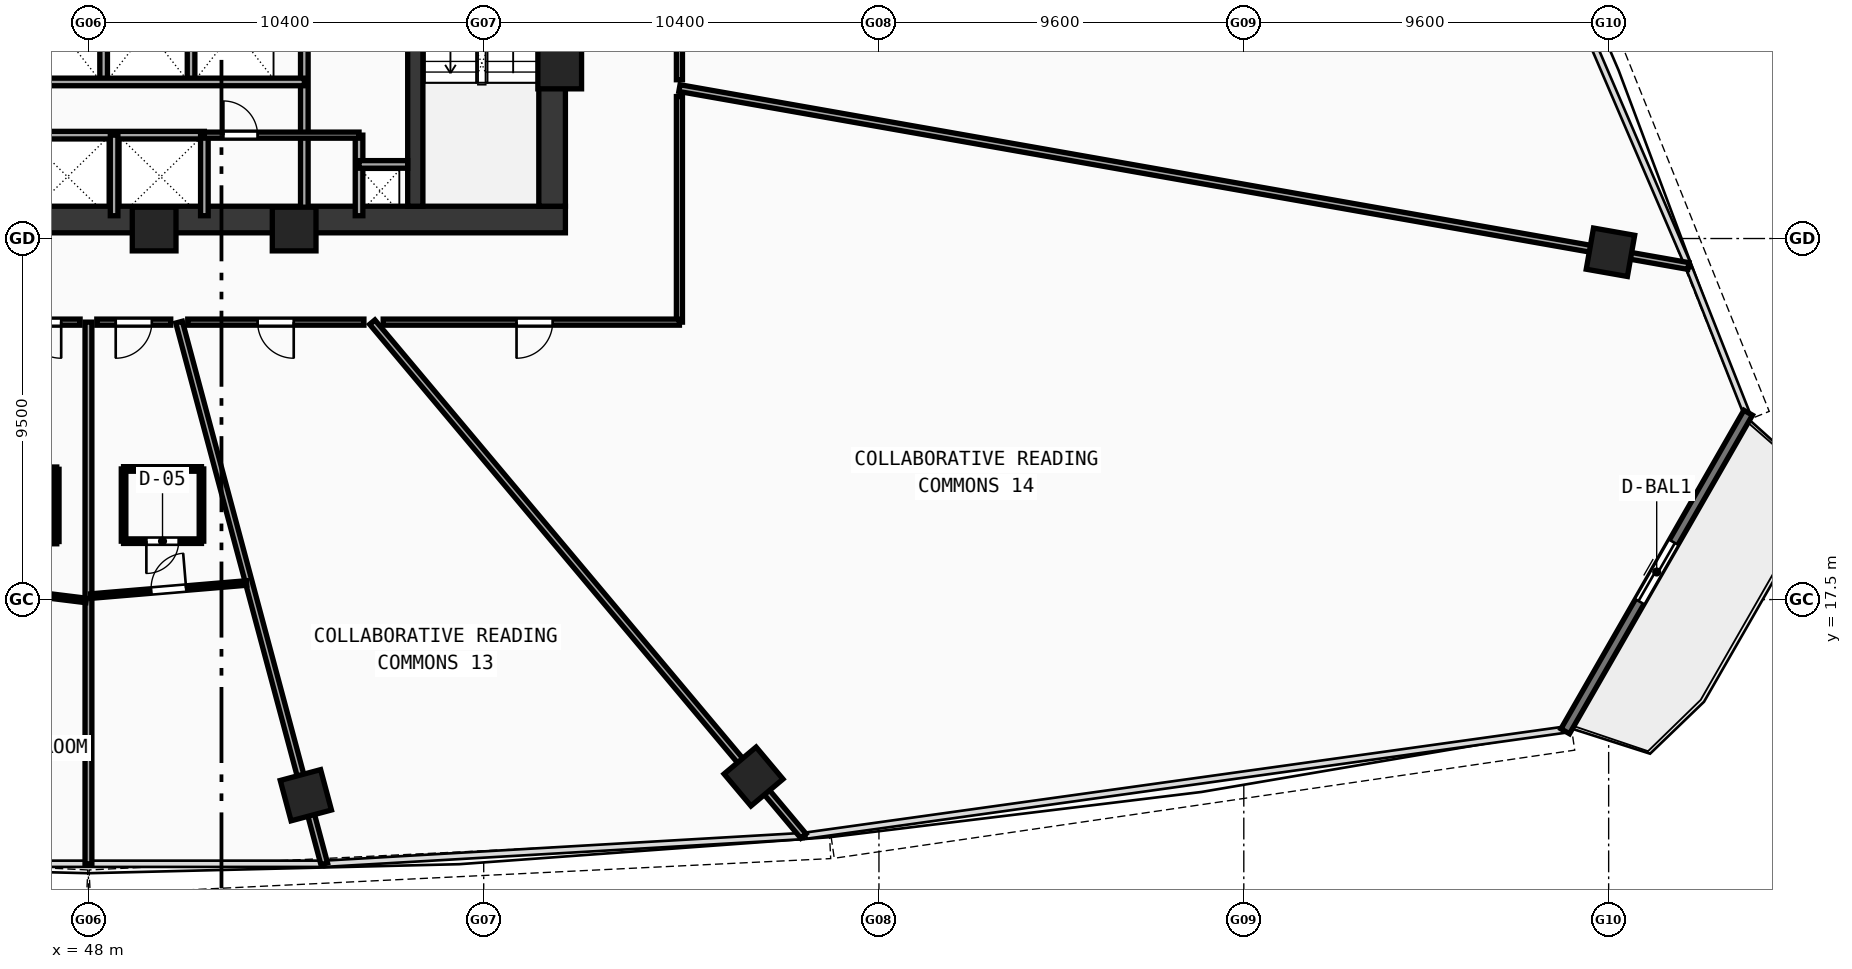
"""IFC4 building model, lengths in metres.
Left out: names, types, materials, properties, quantities, classifications, styles, units other than length and angle.
Written with IfcOpenShell. Run it as: python <this file> out.ifc"""

import sys

from ifc_helpers import new_model, si_unit, direction, frame, frame_2d, origin, origin_with_axes, origin_2d, place, context, subcontext, project, spatial, rectangle, hollow_rectangle, extrude, source, transform, mapped, element, fill, save


model = new_model("IFC4")
c1 = context("Model", 3, precision=1e-05, world=origin(), true_north=direction((0.0, 1.0)))
c2 = subcontext(c1, "Body", "Model", "MODEL_VIEW")
j1 = project(units=[si_unit("LENGTHUNIT", "METRE"), si_unit("PLANEANGLEUNIT", "RADIAN")], contexts=[c1])
p1 = place(None, origin())
s1 = spatial("IfcSite", under=j1, at=p1, CompositionType="ELEMENT")
p2 = place(p1, origin())
s2 = spatial("IfcBuilding", under=s1, at=p2, CompositionType="ELEMENT")
p3 = place(p2, frame((0.0, 0.0, 34.03)))
s3 = spatial("IfcBuildingStorey", under=s2, at=p3, CompositionType="ELEMENT", Elevation=34.03)
p4 = place(p3, frame((35.45, 27.5, 0.0), z_axis=(0.0, 0.0, 1.0), x_axis=(1.0, 0.0, 0.0)))
e1 = element("IfcWall", 1, at=p4, inside=s3, PredefinedType="SHEAR", context=c2, shape_type="SweptSolid", body=[
    extrude(rectangle(XDim=25.1, YDim=0.7, at=frame_2d((12.55, 0.0))), origin(), (0.0, 0.0, 1.0), 3.37),
])
p5 = place(p3, frame((60.2, 27.85, 0.0), z_axis=(0.0, 0.0, 1.0), x_axis=(0.0, 1.0, 0.0)))
e2 = element("IfcWall", 2, at=p5, inside=s3, PredefinedType="SHEAR", context=c2, shape_type="SweptSolid", body=[
    extrude(rectangle(XDim=12.0, YDim=0.7, at=frame_2d((6.0, 0.0))), origin(), (0.0, 0.0, 1.0), 3.37),
])
p6 = place(p3, frame((56.6, 27.85, 0.0), z_axis=(0.0, 0.0, 1.0), x_axis=(0.0, 1.0, 0.0)))
e3 = element("IfcWall", 3, at=p6, inside=s3, PredefinedType="SHEAR", context=c2, shape_type="SweptSolid", body=[
    extrude(rectangle(XDim=12.0, YDim=0.4, at=frame_2d((6.0, 0.0))), origin(), (0.0, 0.0, 1.0), 3.37),
])
p7 = place(p6, frame((9.9, 0.0, 0.0)))
e4 = element("IfcOpeningElement", 4, at=p7, cuts=e3, PredefinedType="OPENING", context=c2, shape_type="SweptSolid", body=[
    extrude(rectangle(XDim=1.1, YDim=2.1, at=frame_2d((0.55, 1.05))), frame((0.0, 0.21, 0.0), z_axis=(0.0, -1.0, 0.0), x_axis=(1.0, 0.0, 0.0)), (0.0, 0.0, 1.0), 0.42),
])
m1 = source(origin(), c2, "Body", "SweptSolid", [
    extrude(hollow_rectangle(XDim=1.15, YDim=1.15, WallThickness=0.048, at=origin_2d()), origin(), (0.0, 0.0, 1.0), 3.63),
])
for number, where, z_axis, x_axis in (
    (5, (49.729, 27.25, -0.26), (0.0, 0.0, 1.0), (1.0, 0.0, 0.0)),
    (6, (53.412, 27.25, -0.26), (0.0, 0.0, 1.0), (1.0, 0.0, 0.0)),
    (7, (60.4, 31.513, -0.26), (0.0, 0.0, 1.0), (1.0, 0.0, 0.0)),
):
    element("IfcColumn", number, at=place(p3, frame(where, z_axis=z_axis, x_axis=x_axis)), inside=s3, PredefinedType="COLUMN", context=c2, shape_type="MappedRepresentation", body=[
        mapped(m1, transform((0.0, 0.0, 0.0), scale=1.0)),
    ])
m2 = source(origin(), c2, "Body", "SweptSolid", [
    extrude(hollow_rectangle(XDim=1.1, YDim=1.1, WallThickness=0.045, at=origin_2d()), origin(), (0.0, 0.0, 1.0), 3.63),
])
for number, where, z_axis, x_axis in (
    (8, (53.72, 12.352, -0.26), (0.0, 0.0, 1.0), (0.966, 0.259, 0.0)),
    (9, (65.5, 12.844, -0.26), (0.0, 0.0, 1.0), (0.766, 0.643, 0.0)),
    (10, (88.048, 26.638, -0.26), (0.0, 0.0, 1.0), (0.174, 0.985, 0.0)),
):
    element("IfcColumn", number, at=place(p3, frame(where, z_axis=z_axis, x_axis=x_axis)), inside=s3, PredefinedType="COLUMN", context=c2, shape_type="MappedRepresentation", body=[
        mapped(m2, transform((0.0, 0.0, 0.0), scale=1.0)),
    ])
p8 = place(p3, frame((86.858, 14.035, 0.0), z_axis=(0.0, 0.0, 1.0), x_axis=(0.497938580997, 0.867212297857, 0.0)))
e11 = element("IfcWall", 11, at=p8, inside=s3, PredefinedType="STANDARD", context=c2, shape_type="SweptSolid", body=[
    extrude(rectangle(XDim=9.666, YDim=0.26, at=frame_2d((4.833, 0.0))), origin(), (0.0, 0.0, 1.0), 3.37),
])
p9 = place(p8, frame((3.933, 0.0, 0.0)))
e12 = element("IfcOpeningElement", 12, at=p9, cuts=e11, PredefinedType="OPENING", context=c2, shape_type="SweptSolid", body=[
    extrude(rectangle(XDim=1.8, YDim=2.15, at=frame_2d((0.9, 1.075))), frame((0.0, 0.14, 0.0), z_axis=(0.0, -1.0, 0.0), x_axis=(1.0, 0.0, 0.0)), (0.0, 0.0, 1.0), 0.28),
])
p10 = place(p3, frame((53.68, 27.6, 0.0), z_axis=(0.0, 0.0, 1.0), x_axis=(0.0, 1.0, 0.0)))
e13 = element("IfcWall", 13, at=p10, inside=s3, PredefinedType="SOLIDWALL", context=c2, shape_type="SweptSolid", body=[
    extrude(rectangle(XDim=9.05, YDim=0.2, at=frame_2d((4.525, 0.0))), origin(), (0.0, 0.0, 1.0), 3.37),
])
p11 = place(p10, frame((6.9, 0.0, 0.0)))
e14 = element("IfcOpeningElement", 14, at=p11, cuts=e13, PredefinedType="OPENING", context=c2, shape_type="SweptSolid", body=[
    extrude(rectangle(XDim=1.05, YDim=2.1, at=frame_2d((0.525, 1.05))), frame((0.0, 0.11, 0.0), z_axis=(0.0, -1.0, 0.0), x_axis=(1.0, 0.0, 0.0)), (0.0, 0.0, 1.0), 0.22),
])
for number, where, z_axis, x_axis in (
    (15, (48.4, 31.12, 0.0), (0.0, 0.0, 1.0), (0.0, 1.0, 0.0)),
    (16, (50.7, 31.12, 0.0), (0.0, 0.0, 1.0), (0.0, 1.0, 0.0)),
):
    element("IfcWall", number, at=place(p3, frame(where, z_axis=z_axis, x_axis=x_axis)), inside=s3, PredefinedType="SOLIDWALL", context=c2, shape_type="SweptSolid", body=[
        extrude(rectangle(XDim=2.7, YDim=0.2, at=frame_2d((1.35, 0.0))), origin(), (0.0, 0.0, 1.0), 3.37),
    ])
p12 = place(p3, frame((43.85, 29.72, 0.0), z_axis=(0.0, 0.0, 1.0), x_axis=(1.0, 0.0, 0.0)))
e17 = element("IfcWall", 17, at=p12, inside=s3, PredefinedType="SOLIDWALL", context=c2, shape_type="SweptSolid", body=[
    extrude(rectangle(XDim=7.2, YDim=0.2, at=frame_2d((3.6, 0.0))), origin(), (0.0, 0.0, 1.0), 3.37),
])
p13 = place(p3, frame((51.05, 27.6, 0.0), z_axis=(0.0, 0.0, 1.0), x_axis=(0.0, 1.0, 0.0)))
e18 = element("IfcWall", 18, at=p13, inside=s3, PredefinedType="SOLIDWALL", context=c2, shape_type="SweptSolid", body=[
    extrude(rectangle(XDim=2.12, YDim=0.2, at=frame_2d((1.06, 0.0))), origin(), (0.0, 0.0, 1.0), 3.37),
])
p14 = place(p3, frame((43.85, 31.12, 0.0), z_axis=(0.0, 0.0, 1.0), x_axis=(1.0, 0.0, 0.0)))
e19 = element("IfcWall", 19, at=p14, inside=s3, PredefinedType="SOLIDWALL", context=c2, shape_type="SweptSolid", body=[
    extrude(rectangle(XDim=9.83, YDim=0.2, at=frame_2d((4.915, 0.0))), origin(), (0.0, 0.0, 1.0), 3.37),
])
for number, where, z_axis, x_axis in (
    (20, (48.675, 27.6, 0.0), (0.0, 0.0, 1.0), (0.0, 1.0, 0.0)),
    (21, (55.12, 27.6, 0.0), (0.0, 0.0, 1.0), (0.0, 1.0, 0.0)),
):
    element("IfcWall", number, at=place(p3, frame(where, z_axis=z_axis, x_axis=x_axis)), inside=s3, PredefinedType="SOLIDWALL", context=c2, shape_type="SweptSolid", body=[
        extrude(rectangle(XDim=2.12, YDim=0.2, at=frame_2d((1.06, 0.0))), origin(), (0.0, 0.0, 1.0), 3.37),
    ])
p15 = place(p3, frame((55.12, 28.95, 0.0), z_axis=(0.0, 0.0, 1.0), x_axis=(1.0, 0.0, 0.0)))
e22 = element("IfcWall", 22, at=p15, inside=s3, PredefinedType="SOLIDWALL", context=c2, shape_type="SweptSolid", body=[
    extrude(rectangle(XDim=1.28, YDim=0.2, at=frame_2d((0.64, 0.0))), origin(), (0.0, 0.0, 1.0), 3.37),
])
p16 = place(p3, frame((51.05, 29.72, 0.0), z_axis=(0.0, 0.0, 1.0), x_axis=(1.0, 0.0, 0.0)))
e23 = element("IfcWall", 23, at=p16, inside=s3, PredefinedType="PARTITIONING", context=c2, shape_type="SweptSolid", body=[
    extrude(rectangle(XDim=4.07, YDim=0.16, at=frame_2d((2.035, 0.0))), origin(), (0.0, 0.0, 1.0), 3.37),
])
p17 = place(p16, frame((0.5, 0.0, 0.0)))
e24 = element("IfcOpeningElement", 24, at=p17, cuts=e23, PredefinedType="OPENING", context=c2, shape_type="SweptSolid", body=[
    extrude(rectangle(XDim=0.9, YDim=2.1, at=frame_2d((0.45, 1.05))), frame((0.0, 0.09, 0.0), z_axis=(0.0, -1.0, 0.0), x_axis=(1.0, 0.0, 0.0)), (0.0, 0.0, 1.0), 0.18),
])
p18 = place(p3, frame((48.0, 24.8, 0.0), z_axis=(0.0, 0.0, 1.0), x_axis=(0.0, -1.0, 0.0)))
e25 = element("IfcWall", 25, at=p18, inside=s3, PredefinedType="PARTITIONING", context=c2, shape_type="SweptSolid", body=[
    extrude(rectangle(XDim=14.252, YDim=0.18, at=frame_2d((7.126, 0.0))), origin(), (0.0, 0.0, 1.0), 2.67),
])
p19 = place(p3, frame((50.385, 24.8, 0.0), z_axis=(0.0, 0.0, 1.0), x_axis=(0.258822100979, -0.965925007464, 0.0)))
e26 = element("IfcWall", 26, at=p19, inside=s3, PredefinedType="PARTITIONING", context=c2, shape_type="SweptSolid", body=[
    extrude(rectangle(XDim=14.755, YDim=0.18, at=frame_2d((7.377, 0.0))), origin(), (0.0, 0.0, 1.0), 2.67),
])
p20 = place(p3, frame((55.468, 24.8, 0.0), z_axis=(0.0, 0.0, 1.0), x_axis=(0.642784869497, -0.766046742403, 0.0)))
e27 = element("IfcWall", 27, at=p20, inside=s3, PredefinedType="PARTITIONING", context=c2, shape_type="SweptSolid", body=[
    extrude(rectangle(XDim=17.65, YDim=0.18, at=frame_2d((8.825, 0.0))), origin(), (0.0, 0.0, 1.0), 2.67),
])
p21 = place(p3, frame((63.55, 30.958, 0.0), z_axis=(0.0, 0.0, 1.0), x_axis=(0.984807983054, -0.17364687303, 0.0)))
e28 = element("IfcWall", 28, at=p21, inside=s3, PredefinedType="PARTITIONING", context=c2, shape_type="SweptSolid", body=[
    extrude(rectangle(XDim=26.958, YDim=0.18, at=frame_2d((13.479, 0.0))), origin(), (0.0, 0.0, 1.0), 2.67),
])
p22 = place(p3, frame((63.55, 41.064, 0.0), z_axis=(0.0, 0.0, 1.0), x_axis=(0.0, -1.0, 0.0)))
e29 = element("IfcWall", 29, at=p22, inside=s3, PredefinedType="PARTITIONING", context=c2, shape_type="SweptSolid", body=[
    extrude(rectangle(XDim=9.886, YDim=0.16, at=frame_2d((4.943, 0.0))), origin(), (0.0, 0.0, 1.0), 2.67),
])
p23 = place(p22, frame((4.468, 0.0, 0.0)))
e30 = element("IfcOpeningElement", 30, at=p23, cuts=e29, PredefinedType="OPENING", context=c2, shape_type="SweptSolid", body=[
    extrude(rectangle(XDim=0.95, YDim=2.1, at=frame_2d((0.475, 1.05))), frame((0.0, 0.09, 0.0), z_axis=(0.0, -1.0, 0.0), x_axis=(1.0, 0.0, 0.0)), (0.0, 0.0, 1.0), 0.18),
])
p24 = place(p3, frame((63.55, 30.735, 0.0), z_axis=(0.0, 0.0, 1.0), x_axis=(0.0, -1.0, 0.0)))
e31 = element("IfcWall", 31, at=p24, inside=s3, PredefinedType="PARTITIONING", context=c2, shape_type="SweptSolid", body=[
    extrude(rectangle(XDim=5.935, YDim=0.16, at=frame_2d((2.967, 0.0))), origin(), (0.0, 0.0, 1.0), 2.97),
])
p25 = place(p3, frame((63.55, 24.8, 0.0), z_axis=(0.0, 0.0, 1.0), x_axis=(-1.0, 0.0, 0.0)))
e32 = element("IfcWall", 32, at=p25, inside=s3, PredefinedType="PARTITIONING", context=c2, shape_type="SweptSolid", body=[
    extrude(rectangle(XDim=7.795, YDim=0.16, at=frame_2d((3.897, 0.0))), origin(), (0.0, 0.0, 1.0), 2.97),
])
p26 = place(p25, frame((3.336, 0.0, 0.0)))
e33 = element("IfcOpeningElement", 33, at=p26, cuts=e32, PredefinedType="OPENING", context=c2, shape_type="SweptSolid", body=[
    extrude(rectangle(XDim=0.95, YDim=2.1, at=frame_2d((0.475, 1.05))), frame((0.0, 0.09, 0.0), z_axis=(0.0, -1.0, 0.0), x_axis=(1.0, 0.0, 0.0)), (0.0, 0.0, 1.0), 0.18),
])
p27 = place(p3, frame((55.248, 24.8, 0.0), z_axis=(0.0, 0.0, 1.0), x_axis=(-1.0, 0.0, 0.0)))
e34 = element("IfcWall", 34, at=p27, inside=s3, PredefinedType="PARTITIONING", context=c2, shape_type="SweptSolid", body=[
    extrude(rectangle(XDim=4.635, YDim=0.16, at=frame_2d((2.318, 0.0))), origin(), (0.0, 0.0, 1.0), 2.67),
])
p28 = place(p27, frame((1.847, 0.0, 0.0)))
e35 = element("IfcOpeningElement", 35, at=p28, cuts=e34, PredefinedType="OPENING", context=c2, shape_type="SweptSolid", body=[
    extrude(rectangle(XDim=0.95, YDim=2.1, at=frame_2d((0.475, 1.05))), frame((0.0, 0.09, 0.0), z_axis=(0.0, -1.0, 0.0), x_axis=(1.0, 0.0, 0.0)), (0.0, 0.0, 1.0), 0.18),
])
p29 = place(p3, frame((50.165, 24.8, 0.0), z_axis=(0.0, 0.0, 1.0), x_axis=(-1.0, 0.0, 0.0)))
e36 = element("IfcWall", 36, at=p29, inside=s3, PredefinedType="PARTITIONING", context=c2, shape_type="SweptSolid", body=[
    extrude(rectangle(XDim=1.945, YDim=0.16, at=frame_2d((0.972, 0.0))), origin(), (0.0, 0.0, 1.0), 3.37),
])
p30 = place(p29, frame((0.498, 0.0, 0.0)))
e37 = element("IfcOpeningElement", 37, at=p30, cuts=e36, PredefinedType="OPENING", context=c2, shape_type="SweptSolid", body=[
    extrude(rectangle(XDim=0.95, YDim=2.1, at=frame_2d((0.475, 1.05))), frame((0.0, 0.09, 0.0), z_axis=(0.0, -1.0, 0.0), x_axis=(1.0, 0.0, 0.0)), (0.0, 0.0, 1.0), 0.18),
])
p31 = place(p3, frame((47.78, 24.8, 0.0), z_axis=(0.0, 0.0, 1.0), x_axis=(-1.0, 0.0, 0.0)))
e38 = element("IfcWall", 38, at=p31, inside=s3, PredefinedType="PARTITIONING", context=c2, shape_type="SweptSolid", body=[
    extrude(rectangle(XDim=1.945, YDim=0.16, at=frame_2d((0.972, 0.0))), origin(), (0.0, 0.0, 1.0), 3.37),
])
p32 = place(p31, frame((0.497, 0.0, 0.0)))
e39 = element("IfcOpeningElement", 39, at=p32, cuts=e38, PredefinedType="OPENING", context=c2, shape_type="SweptSolid", body=[
    extrude(rectangle(XDim=0.95, YDim=2.1, at=frame_2d((0.475, 1.05))), frame((0.0, 0.09, 0.0), z_axis=(0.0, -1.0, 0.0), x_axis=(1.0, 0.0, 0.0)), (0.0, 0.0, 1.0), 0.18),
])
p33 = place(p3, frame((45.116, 19.028, 0.0), z_axis=(0.0, 0.0, 1.0), x_axis=(1.0, 0.0, 0.0)))
e40 = element("IfcWall", 40, at=p33, inside=s3, PredefinedType="PARTITIONING", context=c2, shape_type="SweptSolid", body=[
    extrude(rectangle(XDim=2.05, YDim=0.12, at=frame_2d((1.025, 0.0))), origin(), (0.0, 0.0, 1.0), 3.37),
])
p34 = place(p33, frame((0.6, 0.0, 0.0)))
e41 = element("IfcOpeningElement", 41, at=p34, cuts=e40, PredefinedType="OPENING", context=c2, shape_type="SweptSolid", body=[
    extrude(rectangle(XDim=0.85, YDim=2.1, at=frame_2d((0.425, 1.05))), frame((0.0, 0.07, 0.0), z_axis=(0.0, -1.0, 0.0), x_axis=(1.0, 0.0, 0.0)), (0.0, 0.0, 1.0), 0.14),
])
p35 = place(p3, frame((47.166, 19.028, 0.0), z_axis=(0.0, 0.0, 1.0), x_axis=(0.0, 1.0, 0.0)))
e42 = element("IfcWall", 42, at=p35, inside=s3, PredefinedType="PARTITIONING", context=c2, shape_type="SweptSolid", body=[
    extrude(rectangle(XDim=1.9, YDim=0.12, at=frame_2d((0.95, 0.0))), origin(), (0.0, 0.0, 1.0), 3.37),
])
p36 = place(p3, frame((47.166, 20.928, 0.0), z_axis=(0.0, 0.0, 1.0), x_axis=(-1.0, 0.0, 0.0)))
e43 = element("IfcWall", 43, at=p36, inside=s3, PredefinedType="PARTITIONING", context=c2, shape_type="SweptSolid", body=[
    extrude(rectangle(XDim=2.05, YDim=0.12, at=frame_2d((1.025, 0.0))), origin(), (0.0, 0.0, 1.0), 3.37),
])
p37 = place(p3, frame((43.85, 17.981, 0.0), z_axis=(0.0, 0.0, 1.0), x_axis=(0.992487897066, -0.122342855029, 0.0)))
e44 = element("IfcWall", 44, at=p37, inside=s3, PredefinedType="PARTITIONING", context=c2, shape_type="SweptSolid", body=[
    extrude(rectangle(XDim=4.121, YDim=0.12, at=frame_2d((2.061, 0.0))), origin(), (0.0, 0.0, 1.0), 2.67),
])
p38 = place(p37, frame((1.6, 0.0, 0.0)))
e45 = element("IfcOpeningElement", 45, at=p38, cuts=e44, PredefinedType="OPENING", context=c2, shape_type="SweptSolid", body=[
    extrude(rectangle(XDim=0.92, YDim=2.1, at=frame_2d((0.46, 1.05))), frame((0.0, 0.07, 0.0), z_axis=(0.0, -1.0, 0.0), x_axis=(1.0, 0.0, 0.0)), (0.0, 0.0, 1.0), 0.14),
])
p39 = place(p3, frame((48.924, 19.037, 0.0), z_axis=(0.0, 0.0, 1.0), x_axis=(1.0, 0.0, 0.0)))
e46 = element("IfcWall", 46, at=p39, inside=s3, PredefinedType="PARTITIONING", context=c2, shape_type="SweptSolid", body=[
    extrude(rectangle(XDim=2.05, YDim=0.12, at=frame_2d((1.025, 0.0))), origin(), (0.0, 0.0, 1.0), 3.37),
])
p40 = place(p39, frame((0.6, 0.0, 0.0)))
e47 = element("IfcOpeningElement", 47, at=p40, cuts=e46, PredefinedType="OPENING", context=c2, shape_type="SweptSolid", body=[
    extrude(rectangle(XDim=0.85, YDim=2.1, at=frame_2d((0.425, 1.05))), frame((0.0, 0.07, 0.0), z_axis=(0.0, -1.0, 0.0), x_axis=(1.0, 0.0, 0.0)), (0.0, 0.0, 1.0), 0.14),
])
p41 = place(p3, frame((50.974, 19.037, 0.0), z_axis=(0.0, 0.0, 1.0), x_axis=(0.0, 1.0, 0.0)))
e48 = element("IfcWall", 48, at=p41, inside=s3, PredefinedType="PARTITIONING", context=c2, shape_type="SweptSolid", body=[
    extrude(rectangle(XDim=1.9, YDim=0.12, at=frame_2d((0.95, 0.0))), origin(), (0.0, 0.0, 1.0), 3.37),
])
p42 = place(p3, frame((50.974, 20.937, 0.0), z_axis=(0.0, 0.0, 1.0), x_axis=(-1.0, 0.0, 0.0)))
e49 = element("IfcWall", 49, at=p42, inside=s3, PredefinedType="PARTITIONING", context=c2, shape_type="SweptSolid", body=[
    extrude(rectangle(XDim=2.05, YDim=0.12, at=frame_2d((1.025, 0.0))), origin(), (0.0, 0.0, 1.0), 3.37),
])
p43 = place(p3, frame((48.924, 20.937, 0.0), z_axis=(0.0, 0.0, 1.0), x_axis=(0.0, -1.0, 0.0)))
e50 = element("IfcWall", 50, at=p43, inside=s3, PredefinedType="PARTITIONING", context=c2, shape_type="SweptSolid", body=[
    extrude(rectangle(XDim=1.9, YDim=0.12, at=frame_2d((0.95, 0.0))), origin(), (0.0, 0.0, 1.0), 3.37),
])
p44 = place(p3, frame((48.06, 17.592, 0.0), z_axis=(0.0, 0.0, 1.0), x_axis=(0.996481649932, 0.083811224485, 0.0)))
e51 = element("IfcWall", 51, at=p44, inside=s3, PredefinedType="PARTITIONING", context=c2, shape_type="SweptSolid", body=[
    extrude(rectangle(XDim=4.116, YDim=0.12, at=frame_2d((2.058, 0.0))), origin(), (0.0, 0.0, 1.0), 2.67),
])
p45 = place(p44, frame((1.598, 0.0, 0.0)))
e52 = element("IfcOpeningElement", 52, at=p45, cuts=e51, PredefinedType="OPENING", context=c2, shape_type="SweptSolid", body=[
    extrude(rectangle(XDim=0.92, YDim=2.1, at=frame_2d((0.46, 1.05))), frame((0.0, 0.07, 0.0), z_axis=(0.0, -1.0, 0.0), x_axis=(1.0, 0.0, 0.0)), (0.0, 0.0, 1.0), 0.14),
])
m3 = source(origin(), c2, "Body", "SweptSolid", [
    extrude(rectangle(XDim=1.8, YDim=2.15, at=frame_2d((0.9, 1.075))), frame((0.0, 0.025, 0.0), z_axis=(0.0, -1.0, 0.0), x_axis=(1.0, 0.0, 0.0)), (0.0, 0.0, 1.0), 0.05),
])
p46 = place(p9, origin_with_axes())
e53 = element("IfcDoor", 53, at=p46, inside=s3, OperationType="DOUBLE_DOOR_SLIDING", PredefinedType="DOOR", context=c2, shape_type="MappedRepresentation", body=[
    mapped(m3, transform((0.0, 0.0, 0.0), scale=1.0)),
])
fill(e12, e53)
m4 = source(origin(), c2, "Body", "SweptSolid", [
    extrude(rectangle(XDim=0.9, YDim=2.1, at=frame_2d((0.45, 1.05))), frame((0.0, 0.025, 0.0), z_axis=(0.0, -1.0, 0.0), x_axis=(1.0, 0.0, 0.0)), (0.0, 0.0, 1.0), 0.05),
])
p47 = place(p17, origin_with_axes())
e54 = element("IfcDoor", 54, at=p47, inside=s3, OperationType="SINGLE_SWING_LEFT", PredefinedType="DOOR", context=c2, shape_type="MappedRepresentation", body=[
    mapped(m4, transform((0.0, 0.0, 0.0), scale=1.0)),
])
fill(e24, e54)
m5 = source(origin(), c2, "Body", "SweptSolid", [
    extrude(rectangle(XDim=0.95, YDim=2.1, at=frame_2d((0.475, 1.05))), frame((0.0, 0.025, 0.0), z_axis=(0.0, -1.0, 0.0), x_axis=(1.0, 0.0, 0.0)), (0.0, 0.0, 1.0), 0.05),
])
p48 = place(p32, origin_with_axes())
e55 = element("IfcDoor", 55, at=p48, inside=s3, OperationType="SINGLE_SWING_LEFT", PredefinedType="DOOR", context=c2, shape_type="MappedRepresentation", body=[
    mapped(m5, transform((0.0, 0.0, 0.0), scale=1.0)),
])
fill(e39, e55)
p49 = place(p30, origin_with_axes())
e56 = element("IfcDoor", 56, at=p49, inside=s3, OperationType="SINGLE_SWING_RIGHT", PredefinedType="DOOR", context=c2, shape_type="MappedRepresentation", body=[
    mapped(m5, transform((0.0, 0.0, 0.0), scale=1.0)),
])
fill(e37, e56)
m6 = source(origin(), c2, "Body", "SweptSolid", [
    extrude(rectangle(XDim=0.85, YDim=2.1, at=frame_2d((0.425, 1.05))), frame((0.0, 0.025, 0.0), z_axis=(0.0, -1.0, 0.0), x_axis=(1.0, 0.0, 0.0)), (0.0, 0.0, 1.0), 0.05),
])
p50 = place(p40, frame((0.85, 0.0, 0.0), z_axis=(0.0, 0.0, 1.0), x_axis=(-1.0, 0.0, 0.0)))
e57 = element("IfcDoor", 57, at=p50, inside=s3, OperationType="SINGLE_SWING_RIGHT", PredefinedType="DOOR", context=c2, shape_type="MappedRepresentation", body=[
    mapped(m6, transform((0.0, 0.0, 0.0), scale=1.0)),
])
fill(e47, e57)
m7 = source(origin(), c2, "Body", "SweptSolid", [
    extrude(rectangle(XDim=0.92, YDim=2.1, at=frame_2d((0.46, 1.05))), frame((0.0, 0.025, 0.0), z_axis=(0.0, -1.0, 0.0), x_axis=(1.0, 0.0, 0.0)), (0.0, 0.0, 1.0), 0.05),
])
p51 = place(p45, origin_with_axes())
e58 = element("IfcDoor", 58, at=p51, inside=s3, OperationType="SINGLE_SWING_RIGHT", PredefinedType="DOOR", context=c2, shape_type="MappedRepresentation", body=[
    mapped(m7, transform((0.0, 0.0, 0.0), scale=1.0)),
])
fill(e52, e58)
p52 = place(p28, origin_with_axes())
e59 = element("IfcDoor", 59, at=p52, inside=s3, OperationType="SINGLE_SWING_LEFT", PredefinedType="DOOR", context=c2, shape_type="MappedRepresentation", body=[
    mapped(m5, transform((0.0, 0.0, 0.0), scale=1.0)),
])
fill(e35, e59)
p53 = place(p26, origin_with_axes())
e60 = element("IfcDoor", 60, at=p53, inside=s3, OperationType="SINGLE_SWING_RIGHT", PredefinedType="DOOR", context=c2, shape_type="MappedRepresentation", body=[
    mapped(m5, transform((0.0, 0.0, 0.0), scale=1.0)),
])
fill(e33, e60)
save(model, sys.argv[1])
